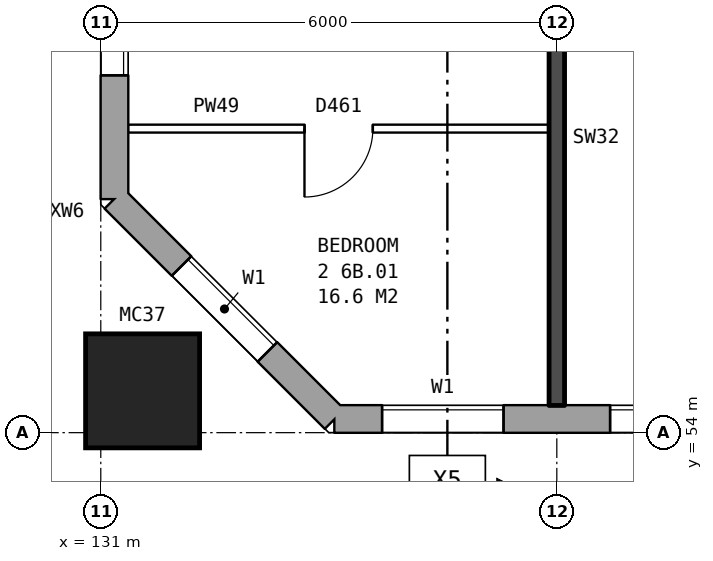
"""IFC4 building model, lengths in metres.
Left out: names, types, materials, properties, quantities, classifications, styles, units other than length and angle.
Written with IfcOpenShell. Run it as: python <this file> out.ifc"""

import sys

from ifc_helpers import new_model, si_unit, direction, frame, frame_2d, origin, origin_2d, place, context, subcontext, project, spatial, rectangle, hollow_rectangle, extrude, element, fill, save


model = new_model("IFC4")
c1 = context("Model", 3, precision=1e-05, world=origin(), true_north=direction((0.0, 1.0)))
c2 = subcontext(c1, "Body", "Model", "MODEL_VIEW")
j1 = project(units=[si_unit("LENGTHUNIT", "METRE"), si_unit("PLANEANGLEUNIT", "RADIAN")], contexts=[c1])
p1 = place(None, origin())
s1 = spatial("IfcSite", under=j1, at=p1, CompositionType="ELEMENT")
p2 = place(p1, origin())
s2 = spatial("IfcBuilding", under=s1, at=p2, CompositionType="ELEMENT")
p3 = place(p2, frame((0.0, 0.0, 25.7)))
s3 = spatial("IfcBuildingStorey", under=s2, at=p3, CompositionType="ELEMENT", Elevation=25.7)
p4 = place(p3, frame((131.55, 54.55, 0.0), z_axis=(0.0, 0.0, 1.0), x_axis=(1.0, 0.0, 0.0)))
e1 = element("IfcColumn", 1, at=p4, inside=s3, PredefinedType="COLUMN", context=c2, shape_type="SweptSolid", body=[
    extrude(hollow_rectangle(XDim=1.5, YDim=1.5, WallThickness=0.08, at=origin_2d()), origin(), (0.0, 0.0, 1.0), 3.1),
])
p5 = place(p3, frame((131.18, 57.075, 0.0), z_axis=(0.0, 0.0, 1.0), x_axis=(0.707106781187, -0.707106781187, 0.0)))
e2 = element("IfcWall", 2, at=p5, inside=s3, PredefinedType="STANDARD", context=c2, shape_type="SweptSolid", body=[
    extrude(rectangle(XDim=4.094, YDim=0.36, at=frame_2d((2.047, 0.0))), origin(), (0.0, 0.0, 1.0), 2.85),
])
p6 = place(p5, frame((1.247, 0.0, 0.8)))
e3 = element("IfcOpeningElement", 3, at=p6, cuts=e2, PredefinedType="OPENING", context=c2, shape_type="SweptSolid", body=[
    extrude(rectangle(XDim=1.6, YDim=1.8, at=frame_2d((0.8, 0.9))), frame((0.0, 0.19, 0.0), z_axis=(0.0, -1.0, 0.0), x_axis=(1.0, 0.0, 0.0)), (0.0, 0.0, 1.0), 0.38),
])
p7 = place(p3, frame((134.075, 54.18, 0.0), z_axis=(0.0, 0.0, 1.0), x_axis=(1.0, 0.0, 0.0)))
e4 = element("IfcWall", 4, at=p7, inside=s3, PredefinedType="STANDARD", context=c2, shape_type="SweptSolid", body=[
    extrude(rectangle(XDim=40.601, YDim=0.36, at=frame_2d((20.3, 0.0))), origin(), (0.0, 0.0, 1.0), 2.85),
])
p8 = place(p7, frame((0.625, 0.0, 0.8)))
e5 = element("IfcOpeningElement", 5, at=p8, cuts=e4, PredefinedType="OPENING", context=c2, shape_type="SweptSolid", body=[
    extrude(rectangle(XDim=1.6, YDim=1.8, at=frame_2d((0.8, 0.9))), frame((0.0, 0.19, 0.0), z_axis=(0.0, -1.0, 0.0), x_axis=(1.0, 0.0, 0.0)), (0.0, 0.0, 1.0), 0.38),
])
p9 = place(p7, frame((3.625, 0.0, 0.8)))
e6 = element("IfcOpeningElement", 6, at=p9, cuts=e4, PredefinedType="OPENING", context=c2, shape_type="SweptSolid", body=[
    extrude(rectangle(XDim=1.6, YDim=1.8, at=frame_2d((0.8, 0.9))), frame((0.0, 0.19, 0.0), z_axis=(0.0, -1.0, 0.0), x_axis=(1.0, 0.0, 0.0)), (0.0, 0.0, 1.0), 0.38),
])
p10 = place(p7, frame((5.525, 0.0, 1.7)))
e7 = element("IfcOpeningElement", 7, at=p10, cuts=e4, PredefinedType="OPENING", context=c2, shape_type="SweptSolid", body=[
    extrude(rectangle(XDim=1.2, YDim=0.9, at=frame_2d((0.6, 0.45))), frame((0.0, 0.19, 0.0), z_axis=(0.0, -1.0, 0.0), x_axis=(1.0, 0.0, 0.0)), (0.0, 0.0, 1.0), 0.38),
])
p11 = place(p7, frame((9.625, 0.0, 0.8)))
e8 = element("IfcOpeningElement", 8, at=p11, cuts=e4, PredefinedType="OPENING", context=c2, shape_type="SweptSolid", body=[
    extrude(rectangle(XDim=1.6, YDim=1.8, at=frame_2d((0.8, 0.9))), frame((0.0, 0.19, 0.0), z_axis=(0.0, -1.0, 0.0), x_axis=(1.0, 0.0, 0.0)), (0.0, 0.0, 1.0), 0.38),
])
p12 = place(p7, frame((12.625, 0.0, 0.8)))
e9 = element("IfcOpeningElement", 9, at=p12, cuts=e4, PredefinedType="OPENING", context=c2, shape_type="SweptSolid", body=[
    extrude(rectangle(XDim=1.6, YDim=1.8, at=frame_2d((0.8, 0.9))), frame((0.0, 0.19, 0.0), z_axis=(0.0, -1.0, 0.0), x_axis=(1.0, 0.0, 0.0)), (0.0, 0.0, 1.0), 0.38),
])
p13 = place(p7, frame((15.625, 0.0, 0.8)))
e10 = element("IfcOpeningElement", 10, at=p13, cuts=e4, PredefinedType="OPENING", context=c2, shape_type="SweptSolid", body=[
    extrude(rectangle(XDim=1.6, YDim=1.8, at=frame_2d((0.8, 0.9))), frame((0.0, 0.19, 0.0), z_axis=(0.0, -1.0, 0.0), x_axis=(1.0, 0.0, 0.0)), (0.0, 0.0, 1.0), 0.38),
])
p14 = place(p7, frame((18.625, 0.0, 0.8)))
e11 = element("IfcOpeningElement", 11, at=p14, cuts=e4, PredefinedType="OPENING", context=c2, shape_type="SweptSolid", body=[
    extrude(rectangle(XDim=1.6, YDim=1.8, at=frame_2d((0.8, 0.9))), frame((0.0, 0.19, 0.0), z_axis=(0.0, -1.0, 0.0), x_axis=(1.0, 0.0, 0.0)), (0.0, 0.0, 1.0), 0.38),
])
p15 = place(p7, frame((21.625, 0.0, 0.8)))
e12 = element("IfcOpeningElement", 12, at=p15, cuts=e4, PredefinedType="OPENING", context=c2, shape_type="SweptSolid", body=[
    extrude(rectangle(XDim=1.6, YDim=1.8, at=frame_2d((0.8, 0.9))), frame((0.0, 0.19, 0.0), z_axis=(0.0, -1.0, 0.0), x_axis=(1.0, 0.0, 0.0)), (0.0, 0.0, 1.0), 0.38),
])
p16 = place(p7, frame((24.625, 0.0, 0.8)))
e13 = element("IfcOpeningElement", 13, at=p16, cuts=e4, PredefinedType="OPENING", context=c2, shape_type="SweptSolid", body=[
    extrude(rectangle(XDim=1.6, YDim=1.8, at=frame_2d((0.8, 0.9))), frame((0.0, 0.19, 0.0), z_axis=(0.0, -1.0, 0.0), x_axis=(1.0, 0.0, 0.0)), (0.0, 0.0, 1.0), 0.38),
])
p17 = place(p7, frame((27.625, 0.0, 0.8)))
e14 = element("IfcOpeningElement", 14, at=p17, cuts=e4, PredefinedType="OPENING", context=c2, shape_type="SweptSolid", body=[
    extrude(rectangle(XDim=1.6, YDim=1.8, at=frame_2d((0.8, 0.9))), frame((0.0, 0.19, 0.0), z_axis=(0.0, -1.0, 0.0), x_axis=(1.0, 0.0, 0.0)), (0.0, 0.0, 1.0), 0.38),
])
p18 = place(p7, frame((30.125, 0.0, 0.8)))
e15 = element("IfcOpeningElement", 15, at=p18, cuts=e4, PredefinedType="OPENING", context=c2, shape_type="SweptSolid", body=[
    extrude(rectangle(XDim=1.2, YDim=1.8, at=frame_2d((0.6, 0.9))), frame((0.0, 0.19, 0.0), z_axis=(0.0, -1.0, 0.0), x_axis=(1.0, 0.0, 0.0)), (0.0, 0.0, 1.0), 0.38),
])
p19 = place(p7, frame((33.825, 0.0, 1.7)))
e16 = element("IfcOpeningElement", 16, at=p19, cuts=e4, PredefinedType="OPENING", context=c2, shape_type="SweptSolid", body=[
    extrude(rectangle(XDim=1.0, YDim=0.9, at=frame_2d((0.5, 0.45))), frame((0.0, 0.19, 0.0), z_axis=(0.0, -1.0, 0.0), x_axis=(1.0, 0.0, 0.0)), (0.0, 0.0, 1.0), 0.38),
])
p20 = place(p7, frame((36.625, 0.0, 0.8)))
e17 = element("IfcOpeningElement", 17, at=p20, cuts=e4, PredefinedType="OPENING", context=c2, shape_type="SweptSolid", body=[
    extrude(rectangle(XDim=1.6, YDim=1.8, at=frame_2d((0.8, 0.9))), frame((0.0, 0.19, 0.0), z_axis=(0.0, -1.0, 0.0), x_axis=(1.0, 0.0, 0.0)), (0.0, 0.0, 1.0), 0.38),
])
p21 = place(p7, frame((8.025, 0.0, 0.8)))
e18 = element("IfcOpeningElement", 18, at=p21, cuts=e4, PredefinedType="OPENING", context=c2, shape_type="SweptSolid", body=[
    extrude(rectangle(XDim=0.6, YDim=0.9, at=frame_2d((0.3, 0.45))), frame((0.0, 0.19, 0.0), z_axis=(0.0, -1.0, 0.0), x_axis=(1.0, 0.0, 0.0)), (0.0, 0.0, 1.0), 0.38),
])
p22 = place(p7, frame((31.625, 0.0, 0.8)))
e19 = element("IfcOpeningElement", 19, at=p22, cuts=e4, PredefinedType="OPENING", context=c2, shape_type="SweptSolid", body=[
    extrude(rectangle(XDim=0.6, YDim=1.2, at=frame_2d((0.3, 0.6))), frame((0.0, 0.19, 0.0), z_axis=(0.0, -1.0, 0.0), x_axis=(1.0, 0.0, 0.0)), (0.0, 0.0, 1.0), 0.38),
])
p23 = place(p7, frame((35.125, 0.0, 0.8)))
e20 = element("IfcOpeningElement", 20, at=p23, cuts=e4, PredefinedType="OPENING", context=c2, shape_type="SweptSolid", body=[
    extrude(rectangle(XDim=1.2, YDim=1.8, at=frame_2d((0.6, 0.9))), frame((0.0, 0.19, 0.0), z_axis=(0.0, -1.0, 0.0), x_axis=(1.0, 0.0, 0.0)), (0.0, 0.0, 1.0), 0.38),
])
p24 = place(p3, frame((131.18, 82.925, 0.0), z_axis=(0.0, 0.0, 1.0), x_axis=(0.0, -1.0, 0.0)))
e21 = element("IfcWall", 21, at=p24, inside=s3, PredefinedType="STANDARD", context=c2, shape_type="SweptSolid", body=[
    extrude(rectangle(XDim=25.851, YDim=0.36, at=frame_2d((12.925, 0.0))), origin(), (0.0, 0.0, 1.0), 2.85),
])
p25 = place(p24, frame((1.625, 0.0, 0.8)))
e22 = element("IfcOpeningElement", 22, at=p25, cuts=e21, PredefinedType="OPENING", context=c2, shape_type="SweptSolid", body=[
    extrude(rectangle(XDim=1.6, YDim=1.8, at=frame_2d((0.8, 0.9))), frame((0.0, 0.19, 0.0), z_axis=(0.0, -1.0, 0.0), x_axis=(1.0, 0.0, 0.0)), (0.0, 0.0, 1.0), 0.38),
])
p26 = place(p24, frame((4.625, 0.0, 0.8)))
e23 = element("IfcOpeningElement", 23, at=p26, cuts=e21, PredefinedType="OPENING", context=c2, shape_type="SweptSolid", body=[
    extrude(rectangle(XDim=1.6, YDim=1.8, at=frame_2d((0.8, 0.9))), frame((0.0, 0.19, 0.0), z_axis=(0.0, -1.0, 0.0), x_axis=(1.0, 0.0, 0.0)), (0.0, 0.0, 1.0), 0.38),
])
p27 = place(p24, frame((19.625, 0.0, 0.8)))
e24 = element("IfcOpeningElement", 24, at=p27, cuts=e21, PredefinedType="OPENING", context=c2, shape_type="SweptSolid", body=[
    extrude(rectangle(XDim=1.6, YDim=1.8, at=frame_2d((0.8, 0.9))), frame((0.0, 0.19, 0.0), z_axis=(0.0, -1.0, 0.0), x_axis=(1.0, 0.0, 0.0)), (0.0, 0.0, 1.0), 0.38),
])
p28 = place(p24, frame((22.625, 0.0, 0.8)))
e25 = element("IfcOpeningElement", 25, at=p28, cuts=e21, PredefinedType="OPENING", context=c2, shape_type="SweptSolid", body=[
    extrude(rectangle(XDim=1.6, YDim=1.8, at=frame_2d((0.8, 0.9))), frame((0.0, 0.19, 0.0), z_axis=(0.0, -1.0, 0.0), x_axis=(1.0, 0.0, 0.0)), (0.0, 0.0, 1.0), 0.38),
])
p29 = place(p3, frame((131.36, 58.0, 0.0), z_axis=(0.0, 0.0, 1.0), x_axis=(1.0, 0.0, 0.0)))
e26 = element("IfcWall", 26, at=p29, inside=s3, PredefinedType="PARTITIONING", context=c2, shape_type="SweptSolid", body=[
    extrude(rectangle(XDim=5.54, YDim=0.1, at=frame_2d((2.77, 0.0))), origin(), (0.0, 0.0, 1.0), 2.85),
])
p30 = place(p29, frame((2.32, 0.0, 0.0)))
e27 = element("IfcOpeningElement", 27, at=p30, cuts=e26, PredefinedType="OPENING", context=c2, shape_type="SweptSolid", body=[
    extrude(rectangle(XDim=0.9, YDim=2.1, at=frame_2d((0.45, 1.05))), frame((0.0, 0.06, 0.0), z_axis=(0.0, -1.0, 0.0), x_axis=(1.0, 0.0, 0.0)), (0.0, 0.0, 1.0), 0.12),
])
p31 = place(p3, frame((137.0, 54.36, 0.0), z_axis=(0.0, 0.0, 1.0), x_axis=(0.0, 1.0, 0.0)))
e28 = element("IfcWall", 28, at=p31, inside=s3, PredefinedType="SOLIDWALL", context=c2, shape_type="SweptSolid", body=[
    extrude(rectangle(XDim=9.44, YDim=0.2, at=frame_2d((4.72, 0.0))), origin(), (0.0, 0.0, 1.0), 2.85),
])
p32 = place(p31, frame((7.04, 0.0, 0.0)))
e29 = element("IfcOpeningElement", 29, at=p32, cuts=e28, PredefinedType="OPENING", context=c2, shape_type="SweptSolid", body=[
    extrude(rectangle(XDim=0.9, YDim=2.1, at=frame_2d((0.45, 1.05))), frame((0.0, 0.11, 0.0), z_axis=(0.0, -1.0, 0.0), x_axis=(1.0, 0.0, 0.0)), (0.0, 0.0, 1.0), 0.22),
])
p33 = place(p6, origin())
e30 = element("IfcWindow", 30, at=p33, inside=s3, PartitioningType="SINGLE_PANEL", PredefinedType="WINDOW", context=c2, shape_type="SweptSolid", body=[
    extrude(rectangle(XDim=1.6, YDim=1.8, at=frame_2d((0.8, 0.9))), frame((0.0, 0.15, 0.0), z_axis=(0.0, -1.0, 0.0), x_axis=(1.0, 0.0, 0.0)), (0.0, 0.0, 1.0), 0.06),
])
fill(e3, e30)
p34 = place(p8, origin())
e31 = element("IfcWindow", 31, at=p34, inside=s3, PartitioningType="SINGLE_PANEL", PredefinedType="WINDOW", context=c2, shape_type="SweptSolid", body=[
    extrude(rectangle(XDim=1.6, YDim=1.8, at=frame_2d((0.8, 0.9))), frame((0.0, 0.15, 0.0), z_axis=(0.0, -1.0, 0.0), x_axis=(1.0, 0.0, 0.0)), (0.0, 0.0, 1.0), 0.06),
])
fill(e5, e31)
p35 = place(p9, origin())
e32 = element("IfcWindow", 32, at=p35, inside=s3, PartitioningType="SINGLE_PANEL", PredefinedType="WINDOW", context=c2, shape_type="SweptSolid", body=[
    extrude(rectangle(XDim=1.6, YDim=1.8, at=frame_2d((0.8, 0.9))), frame((0.0, 0.15, 0.0), z_axis=(0.0, -1.0, 0.0), x_axis=(1.0, 0.0, 0.0)), (0.0, 0.0, 1.0), 0.06),
])
fill(e6, e32)
p36 = place(p28, origin())
e33 = element("IfcWindow", 33, at=p36, inside=s3, PartitioningType="SINGLE_PANEL", PredefinedType="WINDOW", context=c2, shape_type="SweptSolid", body=[
    extrude(rectangle(XDim=1.6, YDim=1.8, at=frame_2d((0.8, 0.9))), frame((0.0, 0.15, 0.0), z_axis=(0.0, -1.0, 0.0), x_axis=(1.0, 0.0, 0.0)), (0.0, 0.0, 1.0), 0.06),
])
fill(e25, e33)
p37 = place(p30, frame((0.9, 0.0, 0.0), z_axis=(0.0, 0.0, 1.0), x_axis=(-1.0, 0.0, 0.0)))
e34 = element("IfcDoor", 34, at=p37, inside=s3, OperationType="SINGLE_SWING_RIGHT", PredefinedType="DOOR", context=c2, shape_type="SweptSolid", body=[
    extrude(rectangle(XDim=0.9, YDim=2.1, at=frame_2d((0.45, 1.05))), frame((0.0, 0.025, 0.0), z_axis=(0.0, -1.0, 0.0), x_axis=(1.0, 0.0, 0.0)), (0.0, 0.0, 1.0), 0.05),
])
fill(e27, e34)
save(model, sys.argv[1])
